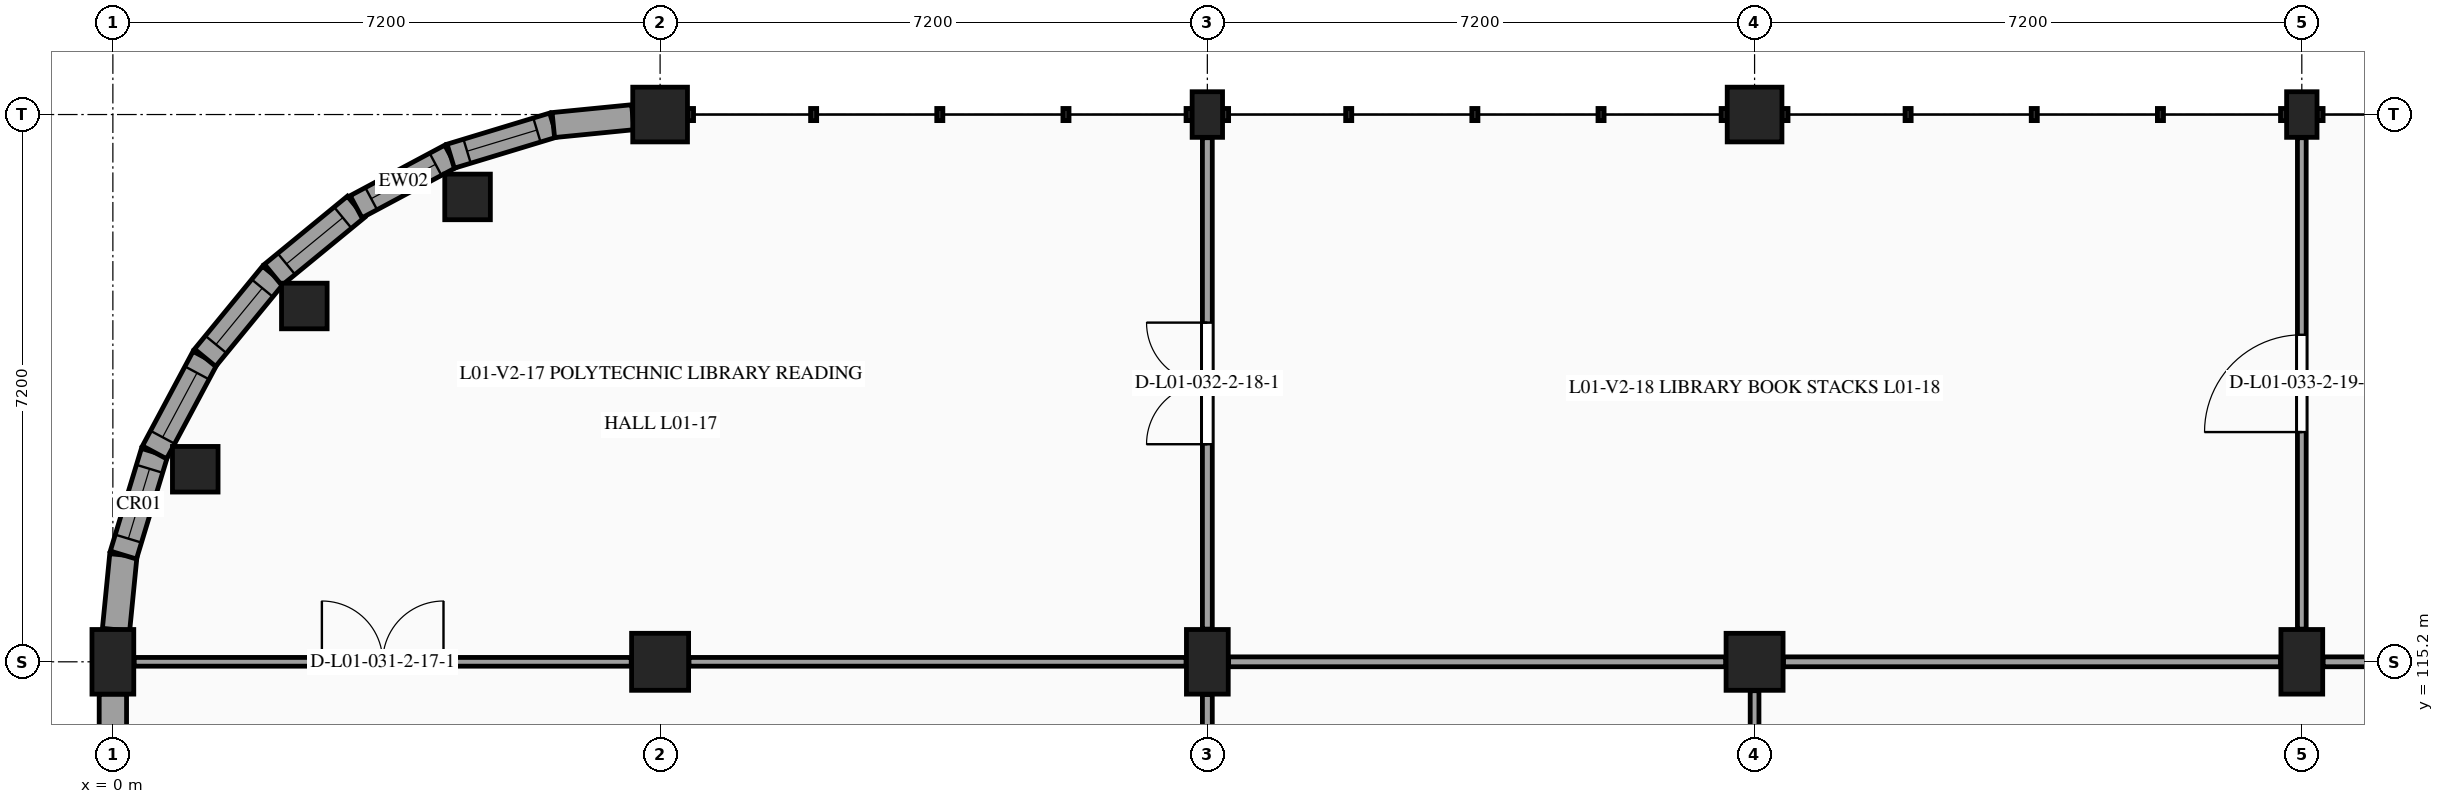
"""IFC4 building model, lengths in metres.
Left out: names, types, materials, properties, quantities, classifications, styles, units other than length and angle.
Written with IfcOpenShell. Run it as: python <this file> out.ifc"""

import sys

from ifc_helpers import new_model, si_unit, direction, frame, frame_2d, origin, origin_2d, place, context, subcontext, project, spatial, rectangle, circle, extrude, element, fill, save


model = new_model("IFC4")
c1 = context("Model", 3, precision=1e-05, world=origin(), true_north=direction((0.0, 1.0)))
c2 = subcontext(c1, "Body", "Model", "MODEL_VIEW")
j1 = project(units=[si_unit("LENGTHUNIT", "METRE"), si_unit("PLANEANGLEUNIT", "RADIAN")], contexts=[c1])
p1 = place(None, origin())
s1 = spatial("IfcSite", under=j1, at=p1, CompositionType="ELEMENT")
p2 = place(p1, origin())
s2 = spatial("IfcBuilding", under=s1, at=p2, CompositionType="ELEMENT")
p3 = place(p2, frame((0.0, 0.0, 5.4)))
s3 = spatial("IfcBuildingStorey", under=s2, at=p3, CompositionType="ELEMENT", Elevation=5.4)
p4 = place(p3, frame((0.0, 115.2, 0.0), z_axis=(0.0, 0.0, 1.0), x_axis=(1.0, 0.0, 0.0)))
e1 = element("IfcColumn", 1, at=p4, inside=s3, PredefinedType="COLUMN", context=c2, shape_type="SweptSolid", body=[
    extrude(rectangle(XDim=0.55, YDim=0.85, at=origin_2d()), origin(), (0.0, 0.0, 1.0), 4.5),
])
p5 = place(p3, frame((7.2, 115.2, 0.0), z_axis=(0.0, 0.0, 1.0), x_axis=(1.0, 0.0, 0.0)))
e2 = element("IfcColumn", 2, at=p5, inside=s3, PredefinedType="COLUMN", context=c2, shape_type="SweptSolid", body=[
    extrude(rectangle(XDim=0.75, YDim=0.75, at=origin_2d()), origin(), (0.0, 0.0, 1.0), 4.5),
])
p6 = place(p3, frame((7.2, 122.4, 0.0), z_axis=(0.0, 0.0, 1.0), x_axis=(1.0, 0.0, 0.0)))
e3 = element("IfcColumn", 3, at=p6, inside=s3, PredefinedType="COLUMN", context=c2, shape_type="SweptSolid", body=[
    extrude(rectangle(XDim=0.72, YDim=0.72, at=origin_2d()), origin(), (0.0, 0.0, 1.0), 4.5),
])
p7 = place(p3, frame((14.4, 115.2, 0.0), z_axis=(0.0, 0.0, 1.0), x_axis=(1.0, 0.0, 0.0)))
e4 = element("IfcColumn", 4, at=p7, inside=s3, PredefinedType="COLUMN", context=c2, shape_type="SweptSolid", body=[
    extrude(rectangle(XDim=0.55, YDim=0.85, at=origin_2d()), origin(), (0.0, 0.0, 1.0), 4.5),
])
p8 = place(p3, frame((14.4, 122.4, 0.0), z_axis=(0.0, 0.0, 1.0), x_axis=(1.0, 0.0, 0.0)))
e5 = element("IfcColumn", 5, at=p8, inside=s3, PredefinedType="PILASTER", context=c2, shape_type="SweptSolid", body=[
    extrude(rectangle(XDim=0.4, YDim=0.6, at=origin_2d()), origin(), (0.0, 0.0, 1.0), 4.5),
])
p9 = place(p3, frame((21.6, 115.2, 0.0), z_axis=(0.0, 0.0, 1.0), x_axis=(1.0, 0.0, 0.0)))
e6 = element("IfcColumn", 6, at=p9, inside=s3, PredefinedType="COLUMN", context=c2, shape_type="SweptSolid", body=[
    extrude(rectangle(XDim=0.75, YDim=0.75, at=origin_2d()), origin(), (0.0, 0.0, 1.0), 4.5),
])
p10 = place(p3, frame((21.6, 122.4, 0.0), z_axis=(0.0, 0.0, 1.0), x_axis=(1.0, 0.0, 0.0)))
e7 = element("IfcColumn", 7, at=p10, inside=s3, PredefinedType="COLUMN", context=c2, shape_type="SweptSolid", body=[
    extrude(rectangle(XDim=0.72, YDim=0.72, at=origin_2d()), origin(), (0.0, 0.0, 1.0), 4.5),
])
p11 = place(p3, frame((28.8, 115.2, 0.0), z_axis=(0.0, 0.0, 1.0), x_axis=(1.0, 0.0, 0.0)))
e8 = element("IfcColumn", 8, at=p11, inside=s3, PredefinedType="COLUMN", context=c2, shape_type="SweptSolid", body=[
    extrude(rectangle(XDim=0.55, YDim=0.85, at=origin_2d()), origin(), (0.0, 0.0, 1.0), 4.5),
])
p12 = place(p3, frame((28.8, 122.4, 0.0), z_axis=(0.0, 0.0, 1.0), x_axis=(1.0, 0.0, 0.0)))
e9 = element("IfcColumn", 9, at=p12, inside=s3, PredefinedType="PILASTER", context=c2, shape_type="SweptSolid", body=[
    extrude(rectangle(XDim=0.4, YDim=0.6, at=origin_2d()), origin(), (0.0, 0.0, 1.0), 4.5),
])
for number, where, z_axis, x_axis in (
    (10, (4.667, 121.316, 0.0), (0.0, 0.0, 1.0), (1.0, 0.0, 0.0)),
    (11, (2.519, 119.881, 0.0), (0.0, 0.0, 1.0), (1.0, 0.0, 0.0)),
    (12, (1.084, 117.733, 0.0), (0.0, 0.0, 1.0), (1.0, 0.0, 0.0)),
):
    element("IfcColumn", number, at=place(p3, frame(where, z_axis=z_axis, x_axis=x_axis)), inside=s3, PredefinedType="COLUMN", context=c2, shape_type="SweptSolid", body=[
        extrude(circle(Radius=0.3, at=origin_2d()), origin(), (0.0, 0.0, 1.0), 4.5),
    ])
p13 = place(p3, frame((0.0, 108.35, 0.0), z_axis=(0.0, 0.0, 1.0), x_axis=(0.0, 1.0, 0.0)))
e13 = element("IfcWall", 13, at=p13, inside=s3, PredefinedType="STANDARD", context=c2, shape_type="SweptSolid", body=[
    extrude(rectangle(XDim=6.425, YDim=0.36, at=frame_2d((3.212, 0.0))), origin(), (0.0, 0.0, 1.0), 3.455),
])
p14 = place(p13, frame((1.153, 0.0, 1.15)))
e14 = element("IfcOpeningElement", 14, at=p14, cuts=e13, PredefinedType="OPENING", context=c2, shape_type="SweptSolid", body=[
    extrude(rectangle(XDim=1.55, YDim=1.35, at=frame_2d((0.775, 0.675))), frame((0.0, 0.19, 0.0), z_axis=(0.0, -1.0, 0.0), x_axis=(1.0, 0.0, 0.0)), (0.0, 0.0, 1.0), 0.38),
])
p15 = place(p13, frame((3.722, 0.0, 1.15)))
e15 = element("IfcOpeningElement", 15, at=p15, cuts=e13, PredefinedType="OPENING", context=c2, shape_type="SweptSolid", body=[
    extrude(rectangle(XDim=1.55, YDim=1.35, at=frame_2d((0.775, 0.675))), frame((0.0, 0.19, 0.0), z_axis=(0.0, -1.0, 0.0), x_axis=(1.0, 0.0, 0.0)), (0.0, 0.0, 1.0), 0.38),
])
p16 = place(p3, frame((0.042, 115.623, 0.0), z_axis=(0.0, 0.0, 1.0), x_axis=(0.09800882272, 0.99518554585, 0.0)))
e16 = element("IfcWall", 16, at=p16, inside=s3, PredefinedType="STANDARD", context=c2, shape_type="SweptSolid", body=[
    extrude(rectangle(XDim=0.986, YDim=0.36, at=frame_2d((0.493, 0.0))), origin(), (0.0, 0.0, 1.0), 4.21),
])
p17 = place(p3, frame((0.138, 116.605, 0.0), z_axis=(0.0, 0.0, 1.0), x_axis=(0.290266641956, 0.956945806495, 0.0)))
e17 = element("IfcWall", 17, at=p17, inside=s3, PredefinedType="STANDARD", context=c2, shape_type="SweptSolid", body=[
    extrude(rectangle(XDim=1.411, YDim=0.36, at=frame_2d((0.706, 0.0))), origin(), (0.0, 0.0, 1.0), 4.21),
])
p18 = place(p17, frame((0.226, 0.0, 1.0)))
e18 = element("IfcOpeningElement", 18, at=p18, cuts=e17, PredefinedType="OPENING", context=c2, shape_type="SweptSolid", body=[
    extrude(rectangle(XDim=0.96, YDim=1.4, at=frame_2d((0.48, 0.7))), frame((0.0, 0.19, 0.0), z_axis=(0.0, -1.0, 0.0), x_axis=(1.0, 0.0, 0.0)), (0.0, 0.0, 1.0), 0.38),
])
p19 = place(p3, frame((0.548, 117.955, 0.0), z_axis=(0.0, 0.0, 1.0), x_axis=(0.471333199182, 0.881955222984, 0.0)))
e19 = element("IfcWall", 19, at=p19, inside=s3, PredefinedType="STANDARD", context=c2, shape_type="SweptSolid", body=[
    extrude(rectangle(XDim=1.411, YDim=0.36, at=frame_2d((0.706, 0.0))), origin(), (0.0, 0.0, 1.0), 4.21),
])
p20 = place(p19, frame((0.226, 0.0, 1.0)))
e20 = element("IfcOpeningElement", 20, at=p20, cuts=e19, PredefinedType="OPENING", context=c2, shape_type="SweptSolid", body=[
    extrude(rectangle(XDim=0.96, YDim=1.4, at=frame_2d((0.48, 0.7))), frame((0.0, 0.19, 0.0), z_axis=(0.0, -1.0, 0.0), x_axis=(1.0, 0.0, 0.0)), (0.0, 0.0, 1.0), 0.38),
])
p21 = place(p3, frame((1.213, 119.2, 0.0), z_axis=(0.0, 0.0, 1.0), x_axis=(0.634433227965, 0.772977670605, 0.0)))
e21 = element("IfcWall", 21, at=p21, inside=s3, PredefinedType="STANDARD", context=c2, shape_type="SweptSolid", body=[
    extrude(rectangle(XDim=1.412, YDim=0.36, at=frame_2d((0.706, 0.0))), origin(), (0.0, 0.0, 1.0), 4.21),
])
p22 = place(p21, frame((0.226, 0.0, 1.0)))
e22 = element("IfcOpeningElement", 22, at=p22, cuts=e21, PredefinedType="OPENING", context=c2, shape_type="SweptSolid", body=[
    extrude(rectangle(XDim=0.96, YDim=1.4, at=frame_2d((0.48, 0.7))), frame((0.0, 0.19, 0.0), z_axis=(0.0, -1.0, 0.0), x_axis=(1.0, 0.0, 0.0)), (0.0, 0.0, 1.0), 0.38),
])
p23 = place(p3, frame((2.109, 120.291, 0.0), z_axis=(0.0, 0.0, 1.0), x_axis=(0.773062495189, 0.63432986571, 0.0)))
e23 = element("IfcWall", 23, at=p23, inside=s3, PredefinedType="STANDARD", context=c2, shape_type="SweptSolid", body=[
    extrude(rectangle(XDim=1.411, YDim=0.36, at=frame_2d((0.706, 0.0))), origin(), (0.0, 0.0, 1.0), 4.21),
])
p24 = place(p23, frame((0.226, 0.0, 1.0)))
e24 = element("IfcOpeningElement", 24, at=p24, cuts=e23, PredefinedType="OPENING", context=c2, shape_type="SweptSolid", body=[
    extrude(rectangle(XDim=0.96, YDim=1.4, at=frame_2d((0.48, 0.7))), frame((0.0, 0.19, 0.0), z_axis=(0.0, -1.0, 0.0), x_axis=(1.0, 0.0, 0.0)), (0.0, 0.0, 1.0), 0.38),
])
p25 = place(p3, frame((3.2, 121.187, 0.0), z_axis=(0.0, 0.0, 1.0), x_axis=(0.881844864465, 0.471539643102, 0.0)))
e25 = element("IfcWall", 25, at=p25, inside=s3, PredefinedType="STANDARD", context=c2, shape_type="SweptSolid", body=[
    extrude(rectangle(XDim=1.411, YDim=0.33, at=frame_2d((0.706, 0.0))), origin(), (0.0, 0.0, 1.0), 4.21),
])
p26 = place(p25, frame((0.226, 0.0, 1.0)))
e26 = element("IfcOpeningElement", 26, at=p26, cuts=e25, PredefinedType="OPENING", context=c2, shape_type="SweptSolid", body=[
    extrude(rectangle(XDim=0.96, YDim=1.4, at=frame_2d((0.48, 0.7))), frame((0.0, 0.175, 0.0), z_axis=(0.0, -1.0, 0.0), x_axis=(1.0, 0.0, 0.0)), (0.0, 0.0, 1.0), 0.35),
])
p27 = place(p3, frame((4.445, 121.852, 0.0), z_axis=(0.0, 0.0, 1.0), x_axis=(0.95696037757, 0.290218599957, 0.0)))
e27 = element("IfcWall", 27, at=p27, inside=s3, PredefinedType="STANDARD", context=c2, shape_type="SweptSolid", body=[
    extrude(rectangle(XDim=1.412, YDim=0.33, at=frame_2d((0.706, 0.0))), origin(), (0.0, 0.0, 1.0), 4.21),
])
p28 = place(p27, frame((0.226, 0.0, 1.0)))
e28 = element("IfcOpeningElement", 28, at=p28, cuts=e27, PredefinedType="OPENING", context=c2, shape_type="SweptSolid", body=[
    extrude(rectangle(XDim=0.96, YDim=1.4, at=frame_2d((0.48, 0.7))), frame((0.0, 0.175, 0.0), z_axis=(0.0, -1.0, 0.0), x_axis=(1.0, 0.0, 0.0)), (0.0, 0.0, 1.0), 0.35),
])
p29 = place(p3, frame((5.795, 122.262, 0.0), z_axis=(0.0, 0.0, 1.0), x_axis=(0.995187764733, 0.097986289481, 0.0)))
e29 = element("IfcWall", 29, at=p29, inside=s3, PredefinedType="STANDARD", context=c2, shape_type="SweptSolid", body=[
    extrude(rectangle(XDim=1.052, YDim=0.33, at=frame_2d((0.526, 0.0))), origin(), (0.0, 0.0, 1.0), 4.21),
])
p30 = place(p3, frame((0.28, 115.2, 0.0), z_axis=(0.0, 0.0, 1.0), x_axis=(1.0, 0.0, 0.0)))
e30 = element("IfcWall", 30, at=p30, inside=s3, PredefinedType="PARTITIONING", context=c2, shape_type="SweptSolid", body=[
    extrude(rectangle(XDim=6.54, YDim=0.115, at=frame_2d((3.27, 0.0))), origin(), (0.0, 0.0, 1.0), 3.46),
])
p31 = place(p30, frame((2.47, 0.0, 0.0)))
e31 = element("IfcOpeningElement", 31, at=p31, cuts=e30, PredefinedType="OPENING", context=c2, shape_type="SweptSolid", body=[
    extrude(rectangle(XDim=1.6, YDim=2.2, at=frame_2d((0.8, 1.1))), frame((0.0, 0.067, 0.0), z_axis=(0.0, -1.0, 0.0), x_axis=(1.0, 0.0, 0.0)), (0.0, 0.0, 1.0), 0.135),
])
p32 = place(p3, frame((14.4, 108.355, 0.0), z_axis=(0.0, 0.0, 1.0), x_axis=(0.0, 1.0, 0.0)))
e32 = element("IfcWall", 32, at=p32, inside=s3, PredefinedType="PARTITIONING", context=c2, shape_type="SweptSolid", body=[
    extrude(rectangle(XDim=6.415, YDim=0.13, at=frame_2d((3.208, 0.0))), origin(), (0.0, 0.0, 1.0), 3.525),
])
p33 = place(p3, frame((7.58, 115.2, 0.0), z_axis=(0.0, 0.0, 1.0), x_axis=(1.0, 0.0, 0.0)))
e33 = element("IfcWall", 33, at=p33, inside=s3, PredefinedType="PARTITIONING", context=c2, shape_type="SweptSolid", body=[
    extrude(rectangle(XDim=6.54, YDim=0.115, at=frame_2d((3.27, 0.0))), origin(), (0.0, 0.0, 1.0), 3.47),
])
p34 = place(p3, frame((14.4, 115.63, 0.0), z_axis=(0.0, 0.0, 1.0), x_axis=(0.0, 1.0, 0.0)))
e34 = element("IfcWall", 34, at=p34, inside=s3, PredefinedType="PARTITIONING", context=c2, shape_type="SweptSolid", body=[
    extrude(rectangle(XDim=6.465, YDim=0.13, at=frame_2d((3.232, 0.0))), origin(), (0.0, 0.0, 1.0), 3.52),
])
p35 = place(p34, frame((2.433, 0.0, 0.0)))
e35 = element("IfcOpeningElement", 35, at=p35, cuts=e34, PredefinedType="OPENING", context=c2, shape_type="SweptSolid", body=[
    extrude(rectangle(XDim=1.6, YDim=2.2, at=frame_2d((0.8, 1.1))), frame((0.0, 0.075, 0.0), z_axis=(0.0, -1.0, 0.0), x_axis=(1.0, 0.0, 0.0)), (0.0, 0.0, 1.0), 0.15),
])
p36 = place(p3, frame((21.6, 108.395, 0.0), z_axis=(0.0, 0.0, 1.0), x_axis=(0.0, 1.0, 0.0)))
e36 = element("IfcWall", 36, at=p36, inside=s3, PredefinedType="PARTITIONING", context=c2, shape_type="SweptSolid", body=[
    extrude(rectangle(XDim=6.425, YDim=0.115, at=frame_2d((3.212, 0.0))), origin(), (0.0, 0.0, 1.0), 3.525),
])
p37 = place(p36, frame((2.413, 0.0, 0.0)))
e37 = element("IfcOpeningElement", 37, at=p37, cuts=e36, PredefinedType="OPENING", context=c2, shape_type="SweptSolid", body=[
    extrude(rectangle(XDim=1.6, YDim=2.2, at=frame_2d((0.8, 1.1))), frame((0.0, 0.067, 0.0), z_axis=(0.0, -1.0, 0.0), x_axis=(1.0, 0.0, 0.0)), (0.0, 0.0, 1.0), 0.135),
])
p38 = place(p3, frame((14.68, 115.2, 0.0), z_axis=(0.0, 0.0, 1.0), x_axis=(1.0, 0.0, 0.0)))
e38 = element("IfcWall", 38, at=p38, inside=s3, PredefinedType="PARTITIONING", context=c2, shape_type="SweptSolid", body=[
    extrude(rectangle(XDim=6.54, YDim=0.13, at=frame_2d((3.27, 0.0))), origin(), (0.0, 0.0, 1.0), 3.485),
])
p39 = place(p3, frame((21.98, 115.2, 0.0), z_axis=(0.0, 0.0, 1.0), x_axis=(1.0, 0.0, 0.0)))
e39 = element("IfcWall", 39, at=p39, inside=s3, PredefinedType="PARTITIONING", context=c2, shape_type="SweptSolid", body=[
    extrude(rectangle(XDim=6.54, YDim=0.13, at=frame_2d((3.27, 0.0))), origin(), (0.0, 0.0, 1.0), 3.49),
])
p40 = place(p3, frame((28.8, 115.63, 0.0), z_axis=(0.0, 0.0, 1.0), x_axis=(0.0, 1.0, 0.0)))
e40 = element("IfcWall", 40, at=p40, inside=s3, PredefinedType="PARTITIONING", context=c2, shape_type="SweptSolid", body=[
    extrude(rectangle(XDim=6.465, YDim=0.115, at=frame_2d((3.232, 0.0))), origin(), (0.0, 0.0, 1.0), 3.52),
])
p41 = place(p40, frame((2.593, 0.0, 0.0)))
e41 = element("IfcOpeningElement", 41, at=p41, cuts=e40, PredefinedType="OPENING", context=c2, shape_type="SweptSolid", body=[
    extrude(rectangle(XDim=1.28, YDim=2.24, at=frame_2d((0.64, 1.12))), frame((0.0, 0.067, 0.0), z_axis=(0.0, -1.0, 0.0), x_axis=(1.0, 0.0, 0.0)), (0.0, 0.0, 1.0), 0.135),
])
p42 = place(p3, frame((29.08, 115.2, 0.0), z_axis=(0.0, 0.0, 1.0), x_axis=(1.0, 0.0, 0.0)))
e42 = element("IfcWall", 42, at=p42, inside=s3, PredefinedType="PARTITIONING", context=c2, shape_type="SweptSolid", body=[
    extrude(rectangle(XDim=6.54, YDim=0.13, at=frame_2d((3.27, 0.0))), origin(), (0.0, 0.0, 1.0), 3.51),
])
p43 = place(p18, origin())
e43 = element("IfcWindow", 43, at=p43, inside=s3, PartitioningType="SINGLE_PANEL", PredefinedType="WINDOW", context=c2, shape_type="SweptSolid", body=[
    extrude(rectangle(XDim=0.96, YDim=1.4, at=frame_2d((0.48, 0.7))), frame((0.0, -0.01, 0.0), z_axis=(0.0, -1.0, 0.0), x_axis=(1.0, 0.0, 0.0)), (0.0, 0.0, 1.0), 0.06),
])
fill(e18, e43)
p44 = place(p20, origin())
e44 = element("IfcWindow", 44, at=p44, inside=s3, PartitioningType="SINGLE_PANEL", PredefinedType="WINDOW", context=c2, shape_type="SweptSolid", body=[
    extrude(rectangle(XDim=0.96, YDim=1.4, at=frame_2d((0.48, 0.7))), frame((0.0, -0.01, 0.0), z_axis=(0.0, -1.0, 0.0), x_axis=(1.0, 0.0, 0.0)), (0.0, 0.0, 1.0), 0.06),
])
fill(e20, e44)
p45 = place(p22, origin())
e45 = element("IfcWindow", 45, at=p45, inside=s3, PartitioningType="SINGLE_PANEL", PredefinedType="WINDOW", context=c2, shape_type="SweptSolid", body=[
    extrude(rectangle(XDim=0.96, YDim=1.4, at=frame_2d((0.48, 0.7))), frame((0.0, -0.01, 0.0), z_axis=(0.0, -1.0, 0.0), x_axis=(1.0, 0.0, 0.0)), (0.0, 0.0, 1.0), 0.06),
])
fill(e22, e45)
p46 = place(p24, origin())
e46 = element("IfcWindow", 46, at=p46, inside=s3, PartitioningType="SINGLE_PANEL", PredefinedType="WINDOW", context=c2, shape_type="SweptSolid", body=[
    extrude(rectangle(XDim=0.96, YDim=1.4, at=frame_2d((0.48, 0.7))), frame((0.0, -0.01, 0.0), z_axis=(0.0, -1.0, 0.0), x_axis=(1.0, 0.0, 0.0)), (0.0, 0.0, 1.0), 0.06),
])
fill(e24, e46)
p47 = place(p26, origin())
e47 = element("IfcWindow", 47, at=p47, inside=s3, PartitioningType="SINGLE_PANEL", PredefinedType="WINDOW", context=c2, shape_type="SweptSolid", body=[
    extrude(rectangle(XDim=0.96, YDim=1.4, at=frame_2d((0.48, 0.7))), frame((0.0, -0.01, 0.0), z_axis=(0.0, -1.0, 0.0), x_axis=(1.0, 0.0, 0.0)), (0.0, 0.0, 1.0), 0.06),
])
fill(e26, e47)
p48 = place(p28, origin())
e48 = element("IfcWindow", 48, at=p48, inside=s3, PartitioningType="SINGLE_PANEL", PredefinedType="WINDOW", context=c2, shape_type="SweptSolid", body=[
    extrude(rectangle(XDim=0.96, YDim=1.4, at=frame_2d((0.48, 0.7))), frame((0.0, -0.01, 0.0), z_axis=(0.0, -1.0, 0.0), x_axis=(1.0, 0.0, 0.0)), (0.0, 0.0, 1.0), 0.06),
])
fill(e28, e48)
p49 = place(p31, origin())
e49 = element("IfcDoor", 49, at=p49, inside=s3, OperationType="DOUBLE_DOOR_SINGLE_SWING", PredefinedType="DOOR", context=c2, shape_type="SweptSolid", body=[
    extrude(rectangle(XDim=1.6, YDim=2.2, at=frame_2d((0.8, 1.1))), frame((0.0, 0.025, 0.0), z_axis=(0.0, -1.0, 0.0), x_axis=(1.0, 0.0, 0.0)), (0.0, 0.0, 1.0), 0.05),
])
fill(e31, e49)
p50 = place(p35, origin())
e50 = element("IfcDoor", 50, at=p50, inside=s3, OperationType="DOUBLE_DOOR_SINGLE_SWING", PredefinedType="DOOR", context=c2, shape_type="SweptSolid", body=[
    extrude(rectangle(XDim=1.6, YDim=2.2, at=frame_2d((0.8, 1.1))), frame((0.0, 0.025, 0.0), z_axis=(0.0, -1.0, 0.0), x_axis=(1.0, 0.0, 0.0)), (0.0, 0.0, 1.0), 0.05),
])
fill(e35, e50)
p51 = place(p41, origin())
e51 = element("IfcDoor", 51, at=p51, inside=s3, OperationType="SINGLE_SWING_LEFT", PredefinedType="DOOR", context=c2, shape_type="SweptSolid", body=[
    extrude(rectangle(XDim=1.28, YDim=2.24, at=frame_2d((0.64, 1.12))), frame((0.0, 0.025, 0.0), z_axis=(0.0, -1.0, 0.0), x_axis=(1.0, 0.0, 0.0)), (0.0, 0.0, 1.0), 0.05),
])
fill(e41, e51)
save(model, sys.argv[1])
